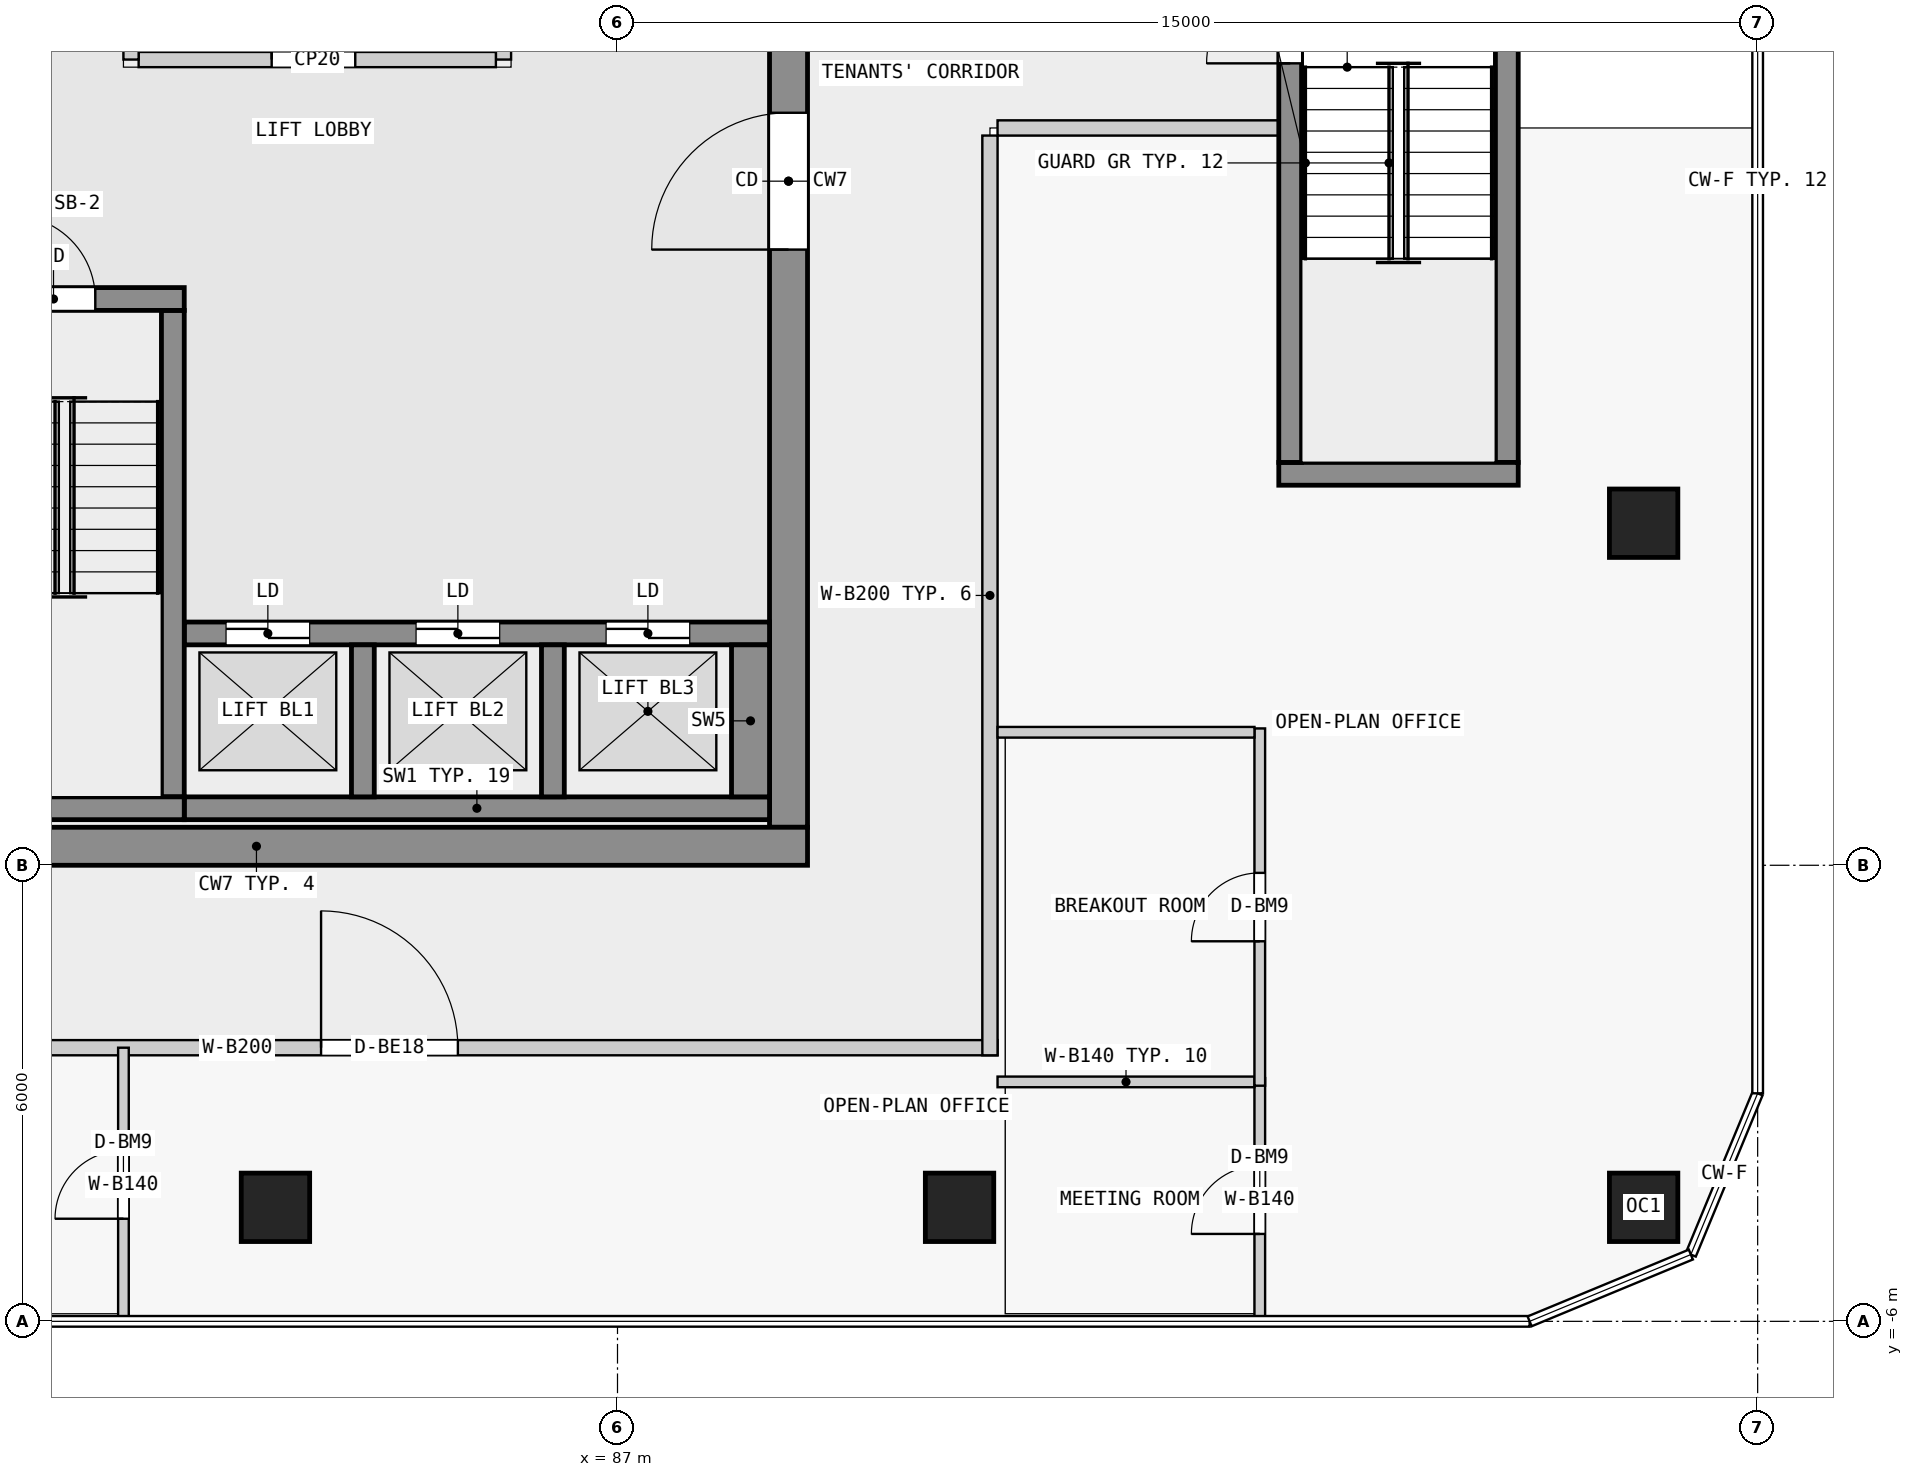
"""IFC4 building model, lengths in metres.
Left out: names, types, materials, properties, quantities, classifications, styles, units other than length and angle.
Written with IfcOpenShell. Run it as: python <this file> out.ifc"""

import sys

from ifc_helpers import new_model, si_unit, direction, frame, frame_2d, origin, origin_2d, place, context, subcontext, project, spatial, rectangle, extrude, element, fill, save


model = new_model("IFC4")
c1 = context("Model", 3, precision=1e-05, world=origin(), true_north=direction((0.0, 1.0)))
c2 = subcontext(c1, "Body", "Model", "MODEL_VIEW")
j1 = project(units=[si_unit("LENGTHUNIT", "METRE"), si_unit("PLANEANGLEUNIT", "RADIAN")], contexts=[c1])
p1 = place(None, origin())
s1 = spatial("IfcSite", under=j1, at=p1, CompositionType="ELEMENT")
p2 = place(p1, origin())
s2 = spatial("IfcBuilding", under=s1, at=p2, CompositionType="ELEMENT")
p3 = place(p2, frame((0.0, 0.0, 47.8)))
s3 = spatial("IfcBuildingStorey", under=s2, at=p3, CompositionType="ELEMENT", Elevation=47.8)
for number, where, z_axis, x_axis in (
    (1, (82.5, -4.5, 0.0), (0.0, 0.0, 1.0), (1.0, 0.0, 0.0)),
    (2, (91.5, -4.5, 0.0), (0.0, 0.0, 1.0), (1.0, 0.0, 0.0)),
    (3, (100.5, -4.5, 0.0), (0.0, 0.0, 1.0), (1.0, 0.0, 0.0)),
    (4, (100.5, 4.5, 0.0), (0.0, 0.0, 1.0), (1.0, 0.0, 0.0)),
):
    element("IfcColumn", number, at=place(p3, frame(where, z_axis=z_axis, x_axis=x_axis)), inside=s3, PredefinedType="COLUMN", context=c2, shape_type="SweptSolid", body=[
        extrude(rectangle(XDim=0.9, YDim=0.9, at=origin_2d()), origin(), (0.0, 0.0, 1.0), 3.5),
    ])
p4 = place(p3, frame((75.0, 0.25, 0.0), z_axis=(0.0, 0.0, 1.0), x_axis=(1.0, 0.0, 0.0)))
e5 = element("IfcWall", 5, at=p4, inside=s3, PredefinedType="SHEAR", context=c2, shape_type="SweptSolid", body=[
    extrude(rectangle(XDim=14.5, YDim=0.5, at=frame_2d((7.25, 0.0))), origin(), (0.0, 0.0, 1.0), 3.25),
])
p5 = place(p3, frame((89.25, 0.5, 0.0), z_axis=(0.0, 0.0, 1.0), x_axis=(0.0, 1.0, 0.0)))
e6 = element("IfcWall", 6, at=p5, inside=s3, PredefinedType="SHEAR", context=c2, shape_type="SweptSolid", body=[
    extrude(rectangle(XDim=17.0, YDim=0.5, at=frame_2d((8.5, 0.0))), origin(), (0.0, 0.0, 1.0), 3.25),
])
p6 = place(p5, frame((7.6, 0.0, 0.0)))
e7 = element("IfcOpeningElement", 7, at=p6, cuts=e6, PredefinedType="OPENING", context=c2, shape_type="SweptSolid", body=[
    extrude(rectangle(XDim=1.8, YDim=2.1, at=frame_2d((0.9, 1.05))), frame((0.0, 0.26, 0.0), z_axis=(0.0, -1.0, 0.0), x_axis=(1.0, 0.0, 0.0)), (0.0, 0.0, 1.0), 0.52),
])
p7 = place(p3, frame((75.48, 0.75, 0.0), z_axis=(0.0, 0.0, 1.0), x_axis=(1.0, 0.0, 0.0)))
e8 = element("IfcWall", 8, at=p7, inside=s3, PredefinedType="SHEAR", context=c2, shape_type="SweptSolid", body=[
    extrude(rectangle(XDim=5.82, YDim=0.3, at=frame_2d((2.91, 0.0))), origin(), (0.0, 0.0, 1.0), 3.25),
])
p8 = place(p3, frame((75.48, 7.45, 0.0), z_axis=(0.0, 0.0, 1.0), x_axis=(1.0, 0.0, 0.0)))
e9 = element("IfcWall", 9, at=p8, inside=s3, PredefinedType="SHEAR", context=c2, shape_type="SweptSolid", body=[
    extrude(rectangle(XDim=5.82, YDim=0.3, at=frame_2d((2.91, 0.0))), origin(), (0.0, 0.0, 1.0), 3.25),
])
p9 = place(p8, frame((0.75, 0.0, 0.0)))
e10 = element("IfcOpeningElement", 10, at=p9, cuts=e9, PredefinedType="OPENING", context=c2, shape_type="SweptSolid", body=[
    extrude(rectangle(XDim=1.1, YDim=2.1, at=frame_2d((0.55, 1.05))), frame((0.0, 0.16, 0.0), z_axis=(0.0, -1.0, 0.0), x_axis=(1.0, 0.0, 0.0)), (0.0, 0.0, 1.0), 0.32),
])
p10 = place(p8, frame((3.55, 0.0, 0.0)))
e11 = element("IfcOpeningElement", 11, at=p10, cuts=e9, PredefinedType="OPENING", context=c2, shape_type="SweptSolid", body=[
    extrude(rectangle(XDim=1.1, YDim=2.1, at=frame_2d((0.55, 1.05))), frame((0.0, 0.16, 0.0), z_axis=(0.0, -1.0, 0.0), x_axis=(1.0, 0.0, 0.0)), (0.0, 0.0, 1.0), 0.32),
])
p11 = place(p3, frame((81.15, 0.9, 0.0), z_axis=(0.0, 0.0, 1.0), x_axis=(0.0, 1.0, 0.0)))
e12 = element("IfcWall", 12, at=p11, inside=s3, PredefinedType="SHEAR", context=c2, shape_type="SweptSolid", body=[
    extrude(rectangle(XDim=6.4, YDim=0.3, at=frame_2d((3.2, 0.0))), origin(), (0.0, 0.0, 1.0), 3.25),
])
p12 = place(p3, frame((81.3, 0.75, 0.0), z_axis=(0.0, 0.0, 1.0), x_axis=(1.0, 0.0, 0.0)))
e13 = element("IfcWall", 13, at=p12, inside=s3, PredefinedType="SHEAR", context=c2, shape_type="SweptSolid", body=[
    extrude(rectangle(XDim=7.7, YDim=0.3, at=frame_2d((3.85, 0.0))), origin(), (0.0, 0.0, 1.0), 3.25),
])
for number, where, z_axis, x_axis in (
    (14, (83.65, 0.9, 0.0), (0.0, 0.0, 1.0), (0.0, 1.0, 0.0)),
    (15, (86.15, 0.9, 0.0), (0.0, 0.0, 1.0), (0.0, 1.0, 0.0)),
):
    element("IfcWall", number, at=place(p3, frame(where, z_axis=z_axis, x_axis=x_axis)), inside=s3, PredefinedType="SHEAR", context=c2, shape_type="SweptSolid", body=[
        extrude(rectangle(XDim=2.0, YDim=0.3, at=frame_2d((1.0, 0.0))), origin(), (0.0, 0.0, 1.0), 3.25),
    ])
p13 = place(p3, frame((88.75, 0.9, 0.0), z_axis=(0.0, 0.0, 1.0), x_axis=(0.0, 1.0, 0.0)))
e16 = element("IfcWall", 16, at=p13, inside=s3, PredefinedType="SHEAR", context=c2, shape_type="SweptSolid", body=[
    extrude(rectangle(XDim=2.0, YDim=0.5, at=frame_2d((1.0, 0.0))), origin(), (0.0, 0.0, 1.0), 3.25),
])
p14 = place(p3, frame((81.3, 3.05, 0.0), z_axis=(0.0, 0.0, 1.0), x_axis=(1.0, 0.0, 0.0)))
e17 = element("IfcWall", 17, at=p14, inside=s3, PredefinedType="SHEAR", context=c2, shape_type="SweptSolid", body=[
    extrude(rectangle(XDim=7.7, YDim=0.3, at=frame_2d((3.85, 0.0))), origin(), (0.0, 0.0, 1.0), 3.25),
])
p15 = place(p14, frame((0.55, 0.0, 0.0)))
e18 = element("IfcOpeningElement", 18, at=p15, cuts=e17, PredefinedType="OPENING", context=c2, shape_type="SweptSolid", body=[
    extrude(rectangle(XDim=1.1, YDim=2.1, at=frame_2d((0.55, 1.05))), frame((0.0, 0.16, 0.0), z_axis=(0.0, -1.0, 0.0), x_axis=(1.0, 0.0, 0.0)), (0.0, 0.0, 1.0), 0.32),
])
p16 = place(p14, frame((3.05, 0.0, 0.0)))
e19 = element("IfcOpeningElement", 19, at=p16, cuts=e17, PredefinedType="OPENING", context=c2, shape_type="SweptSolid", body=[
    extrude(rectangle(XDim=1.1, YDim=2.1, at=frame_2d((0.55, 1.05))), frame((0.0, 0.16, 0.0), z_axis=(0.0, -1.0, 0.0), x_axis=(1.0, 0.0, 0.0)), (0.0, 0.0, 1.0), 0.32),
])
p17 = place(p14, frame((5.55, 0.0, 0.0)))
e20 = element("IfcOpeningElement", 20, at=p17, cuts=e17, PredefinedType="OPENING", context=c2, shape_type="SweptSolid", body=[
    extrude(rectangle(XDim=1.1, YDim=2.1, at=frame_2d((0.55, 1.05))), frame((0.0, 0.16, 0.0), z_axis=(0.0, -1.0, 0.0), x_axis=(1.0, 0.0, 0.0)), (0.0, 0.0, 1.0), 0.32),
])
p18 = place(p3, frame((95.85, 5.3, 0.0), z_axis=(0.0, 0.0, 1.0), x_axis=(0.0, 1.0, 0.0)))
e21 = element("IfcWall", 21, at=p18, inside=s3, PredefinedType="SHEAR", context=c2, shape_type="SweptSolid", body=[
    extrude(rectangle(XDim=6.4, YDim=0.3, at=frame_2d((3.2, 0.0))), origin(), (0.0, 0.0, 1.0), 3.25),
])
p19 = place(p18, frame((5.25, 0.0, 0.0)))
e22 = element("IfcOpeningElement", 22, at=p19, cuts=e21, PredefinedType="OPENING", context=c2, shape_type="SweptSolid", body=[
    extrude(rectangle(XDim=1.1, YDim=2.1, at=frame_2d((0.55, 1.05))), frame((0.0, 0.16, 0.0), z_axis=(0.0, -1.0, 0.0), x_axis=(1.0, 0.0, 0.0)), (0.0, 0.0, 1.0), 0.32),
])
p20 = place(p3, frame((98.7, 5.3, 0.0), z_axis=(0.0, 0.0, 1.0), x_axis=(0.0, 1.0, 0.0)))
e23 = element("IfcWall", 23, at=p20, inside=s3, PredefinedType="SHEAR", context=c2, shape_type="SweptSolid", body=[
    extrude(rectangle(XDim=6.4, YDim=0.3, at=frame_2d((3.2, 0.0))), origin(), (0.0, 0.0, 1.0), 3.25),
])
p21 = place(p3, frame((95.7, 5.15, 0.0), z_axis=(0.0, 0.0, 1.0), x_axis=(1.0, 0.0, 0.0)))
e24 = element("IfcWall", 24, at=p21, inside=s3, PredefinedType="SHEAR", context=c2, shape_type="SweptSolid", body=[
    extrude(rectangle(XDim=3.15, YDim=0.3, at=frame_2d((1.575, 0.0))), origin(), (0.0, 0.0, 1.0), 3.25),
])
p22 = place(p3, frame((80.6, 10.6, 0.0), z_axis=(0.0, 0.0, 1.0), x_axis=(0.0, 1.0, 0.0)))
e25 = element("IfcWall", 25, at=p22, inside=s3, PredefinedType="PARTITIONING", context=c2, shape_type="SweptSolid", body=[
    extrude(rectangle(XDim=3.4, YDim=0.2, at=frame_2d((1.7, 0.0))), origin(), (0.0, 0.0, 1.0), 3.25),
])
p23 = place(p3, frame((80.7, 10.6, 0.0), z_axis=(0.0, 0.0, 1.0), x_axis=(1.0, 0.0, 0.0)))
e26 = element("IfcWall", 26, at=p23, inside=s3, PredefinedType="PARTITIONING", context=c2, shape_type="SweptSolid", body=[
    extrude(rectangle(XDim=4.7, YDim=0.2, at=frame_2d((2.35, 0.0))), origin(), (0.0, 0.0, 1.0), 3.25),
])
p24 = place(p23, frame((1.75, 0.0, 0.0)))
e27 = element("IfcOpeningElement", 27, at=p24, cuts=e26, PredefinedType="OPENING", context=c2, shape_type="SweptSolid", body=[
    extrude(rectangle(XDim=1.1, YDim=2.1, at=frame_2d((0.55, 1.05))), frame((0.0, 0.11, 0.0), z_axis=(0.0, -1.0, 0.0), x_axis=(1.0, 0.0, 0.0)), (0.0, 0.0, 1.0), 0.22),
])
p25 = place(p3, frame((85.5, 10.6, 0.0), z_axis=(0.0, 0.0, 1.0), x_axis=(0.0, 1.0, 0.0)))
e28 = element("IfcWall", 28, at=p25, inside=s3, PredefinedType="PARTITIONING", context=c2, shape_type="SweptSolid", body=[
    extrude(rectangle(XDim=3.4, YDim=0.2, at=frame_2d((1.7, 0.0))), origin(), (0.0, 0.0, 1.0), 3.25),
])
p26 = place(p3, frame((72.0, -2.4, 0.0), z_axis=(0.0, 0.0, 1.0), x_axis=(1.0, 0.0, 0.0)))
e29 = element("IfcWall", 29, at=p26, inside=s3, PredefinedType="PARTITIONING", context=c2, shape_type="SweptSolid", body=[
    extrude(rectangle(XDim=20.0, YDim=0.2, at=frame_2d((10.0, 0.0))), origin(), (0.0, 0.0, 1.0), 3.25),
])
p27 = place(p26, frame((11.1, 0.0, 0.0)))
e30 = element("IfcOpeningElement", 30, at=p27, cuts=e29, PredefinedType="OPENING", context=c2, shape_type="SweptSolid", body=[
    extrude(rectangle(XDim=1.8, YDim=2.1, at=frame_2d((0.9, 1.05))), frame((0.0, 0.11, 0.0), z_axis=(0.0, -1.0, 0.0), x_axis=(1.0, 0.0, 0.0)), (0.0, 0.0, 1.0), 0.22),
])
p28 = place(p3, frame((91.9, -2.5, 0.0), z_axis=(0.0, 0.0, 1.0), x_axis=(0.0, 1.0, 0.0)))
e31 = element("IfcWall", 31, at=p28, inside=s3, PredefinedType="PARTITIONING", context=c2, shape_type="SweptSolid", body=[
    extrude(rectangle(XDim=12.1, YDim=0.2, at=frame_2d((6.05, 0.0))), origin(), (0.0, 0.0, 1.0), 3.25),
])
p29 = place(p3, frame((92.0, 9.7, 0.0), z_axis=(0.0, 0.0, 1.0), x_axis=(1.0, 0.0, 0.0)))
e32 = element("IfcWall", 32, at=p29, inside=s3, PredefinedType="PARTITIONING", context=c2, shape_type="SweptSolid", body=[
    extrude(rectangle(XDim=3.7, YDim=0.2, at=frame_2d((1.85, 0.0))), origin(), (0.0, 0.0, 1.0), 3.25),
])
p30 = place(p3, frame((80.5, -6.0, 0.0), z_axis=(0.0, 0.0, 1.0), x_axis=(0.0, 1.0, 0.0)))
e33 = element("IfcWall", 33, at=p30, inside=s3, PredefinedType="PARTITIONING", context=c2, shape_type="SweptSolid", body=[
    extrude(rectangle(XDim=3.6, YDim=0.14, at=frame_2d((1.8, 0.0))), origin(), (0.0, 0.0, 1.0), 3.25),
])
p31 = place(p30, frame((1.35, 0.0, 0.0)))
e34 = element("IfcOpeningElement", 34, at=p31, cuts=e33, PredefinedType="OPENING", context=c2, shape_type="SweptSolid", body=[
    extrude(rectangle(XDim=0.9, YDim=2.4, at=frame_2d((0.45, 1.2))), frame((0.0, 0.08, 0.0), z_axis=(0.0, -1.0, 0.0), x_axis=(1.0, 0.0, 0.0)), (0.0, 0.0, 1.0), 0.16),
])
p32 = place(p3, frame((95.45, -6.0, 0.0), z_axis=(0.0, 0.0, 1.0), x_axis=(0.0, 1.0, 0.0)))
e35 = element("IfcWall", 35, at=p32, inside=s3, PredefinedType="PARTITIONING", context=c2, shape_type="SweptSolid", body=[
    extrude(rectangle(XDim=3.2, YDim=0.14, at=frame_2d((1.6, 0.0))), origin(), (0.0, 0.0, 1.0), 3.25),
])
p33 = place(p32, frame((1.15, 0.0, 0.0)))
e36 = element("IfcOpeningElement", 36, at=p33, cuts=e35, PredefinedType="OPENING", context=c2, shape_type="SweptSolid", body=[
    extrude(rectangle(XDim=0.9, YDim=2.4, at=frame_2d((0.45, 1.2))), frame((0.0, 0.08, 0.0), z_axis=(0.0, -1.0, 0.0), x_axis=(1.0, 0.0, 0.0)), (0.0, 0.0, 1.0), 0.16),
])
p34 = place(p3, frame((92.0, -2.85, 0.0), z_axis=(0.0, 0.0, 1.0), x_axis=(1.0, 0.0, 0.0)))
e37 = element("IfcWall", 37, at=p34, inside=s3, PredefinedType="PARTITIONING", context=c2, shape_type="SweptSolid", body=[
    extrude(rectangle(XDim=3.38, YDim=0.14, at=frame_2d((1.69, 0.0))), origin(), (0.0, 0.0, 1.0), 3.25),
])
p35 = place(p3, frame((95.45, -2.9, 0.0), z_axis=(0.0, 0.0, 1.0), x_axis=(0.0, 1.0, 0.0)))
e38 = element("IfcWall", 38, at=p35, inside=s3, PredefinedType="PARTITIONING", context=c2, shape_type="SweptSolid", body=[
    extrude(rectangle(XDim=4.7, YDim=0.14, at=frame_2d((2.35, 0.0))), origin(), (0.0, 0.0, 1.0), 3.25),
])
p36 = place(p35, frame((1.9, 0.0, 0.0)))
e39 = element("IfcOpeningElement", 39, at=p36, cuts=e38, PredefinedType="OPENING", context=c2, shape_type="SweptSolid", body=[
    extrude(rectangle(XDim=0.9, YDim=2.4, at=frame_2d((0.45, 1.2))), frame((0.0, 0.08, 0.0), z_axis=(0.0, -1.0, 0.0), x_axis=(1.0, 0.0, 0.0)), (0.0, 0.0, 1.0), 0.16),
])
p37 = place(p3, frame((92.0, 1.75, 0.0), z_axis=(0.0, 0.0, 1.0), x_axis=(1.0, 0.0, 0.0)))
e40 = element("IfcWall", 40, at=p37, inside=s3, PredefinedType="PARTITIONING", context=c2, shape_type="SweptSolid", body=[
    extrude(rectangle(XDim=3.38, YDim=0.14, at=frame_2d((1.69, 0.0))), origin(), (0.0, 0.0, 1.0), 3.25),
])
p38 = place(p24, origin())
e41 = element("IfcDoor", 41, at=p38, inside=s3, OperationType="SINGLE_SWING_LEFT", PredefinedType="DOOR", context=c2, shape_type="SweptSolid", body=[
    extrude(rectangle(XDim=1.1, YDim=2.1, at=frame_2d((0.55, 1.05))), frame((0.0, 0.025, 0.0), z_axis=(0.0, -1.0, 0.0), x_axis=(1.0, 0.0, 0.0)), (0.0, 0.0, 1.0), 0.05),
])
fill(e27, e41)
p39 = place(p15, origin())
e42 = element("IfcDoor", 42, at=p39, inside=s3, OperationType="DOUBLE_DOOR_SLIDING", PredefinedType="DOOR", context=c2, shape_type="SweptSolid", body=[
    extrude(rectangle(XDim=1.1, YDim=2.1, at=frame_2d((0.55, 1.05))), frame((0.0, 0.025, 0.0), z_axis=(0.0, -1.0, 0.0), x_axis=(1.0, 0.0, 0.0)), (0.0, 0.0, 1.0), 0.05),
])
fill(e18, e42)
p40 = place(p16, origin())
e43 = element("IfcDoor", 43, at=p40, inside=s3, OperationType="DOUBLE_DOOR_SLIDING", PredefinedType="DOOR", context=c2, shape_type="SweptSolid", body=[
    extrude(rectangle(XDim=1.1, YDim=2.1, at=frame_2d((0.55, 1.05))), frame((0.0, 0.025, 0.0), z_axis=(0.0, -1.0, 0.0), x_axis=(1.0, 0.0, 0.0)), (0.0, 0.0, 1.0), 0.05),
])
fill(e19, e43)
p41 = place(p17, origin())
e44 = element("IfcDoor", 44, at=p41, inside=s3, OperationType="DOUBLE_DOOR_SLIDING", PredefinedType="DOOR", context=c2, shape_type="SweptSolid", body=[
    extrude(rectangle(XDim=1.1, YDim=2.1, at=frame_2d((0.55, 1.05))), frame((0.0, 0.025, 0.0), z_axis=(0.0, -1.0, 0.0), x_axis=(1.0, 0.0, 0.0)), (0.0, 0.0, 1.0), 0.05),
])
fill(e20, e44)
p42 = place(p10, origin())
e45 = element("IfcDoor", 45, at=p42, inside=s3, OperationType="SINGLE_SWING_LEFT", PredefinedType="DOOR", context=c2, shape_type="SweptSolid", body=[
    extrude(rectangle(XDim=1.1, YDim=2.1, at=frame_2d((0.55, 1.05))), frame((0.0, 0.025, 0.0), z_axis=(0.0, -1.0, 0.0), x_axis=(1.0, 0.0, 0.0)), (0.0, 0.0, 1.0), 0.05),
])
fill(e11, e45)
p43 = place(p19, origin())
e46 = element("IfcDoor", 46, at=p43, inside=s3, OperationType="SINGLE_SWING_LEFT", PredefinedType="DOOR", context=c2, shape_type="SweptSolid", body=[
    extrude(rectangle(XDim=1.1, YDim=2.1, at=frame_2d((0.55, 1.05))), frame((0.0, 0.025, 0.0), z_axis=(0.0, -1.0, 0.0), x_axis=(1.0, 0.0, 0.0)), (0.0, 0.0, 1.0), 0.05),
])
fill(e22, e46)
p44 = place(p6, origin())
e47 = element("IfcDoor", 47, at=p44, inside=s3, OperationType="DOUBLE_DOOR_SINGLE_SWING", PredefinedType="DOOR", context=c2, shape_type="SweptSolid", body=[
    extrude(rectangle(XDim=1.8, YDim=2.1, at=frame_2d((0.9, 1.05))), frame((0.0, 0.025, 0.0), z_axis=(0.0, -1.0, 0.0), x_axis=(1.0, 0.0, 0.0)), (0.0, 0.0, 1.0), 0.05),
])
fill(e7, e47)
p45 = place(p27, origin())
e48 = element("IfcDoor", 48, at=p45, inside=s3, OperationType="DOUBLE_DOOR_SINGLE_SWING", PredefinedType="DOOR", context=c2, shape_type="SweptSolid", body=[
    extrude(rectangle(XDim=1.8, YDim=2.1, at=frame_2d((0.9, 1.05))), frame((0.0, 0.025, 0.0), z_axis=(0.0, -1.0, 0.0), x_axis=(1.0, 0.0, 0.0)), (0.0, 0.0, 1.0), 0.05),
])
fill(e30, e48)
p46 = place(p31, origin())
e49 = element("IfcDoor", 49, at=p46, inside=s3, OperationType="SINGLE_SWING_LEFT", PredefinedType="DOOR", context=c2, shape_type="SweptSolid", body=[
    extrude(rectangle(XDim=0.9, YDim=2.4, at=frame_2d((0.45, 1.2))), frame((0.0, 0.025, 0.0), z_axis=(0.0, -1.0, 0.0), x_axis=(1.0, 0.0, 0.0)), (0.0, 0.0, 1.0), 0.05),
])
fill(e34, e49)
p47 = place(p33, origin())
e50 = element("IfcDoor", 50, at=p47, inside=s3, OperationType="SINGLE_SWING_LEFT", PredefinedType="DOOR", context=c2, shape_type="SweptSolid", body=[
    extrude(rectangle(XDim=0.9, YDim=2.4, at=frame_2d((0.45, 1.2))), frame((0.0, 0.025, 0.0), z_axis=(0.0, -1.0, 0.0), x_axis=(1.0, 0.0, 0.0)), (0.0, 0.0, 1.0), 0.05),
])
fill(e36, e50)
p48 = place(p36, origin())
e51 = element("IfcDoor", 51, at=p48, inside=s3, OperationType="SINGLE_SWING_LEFT", PredefinedType="DOOR", context=c2, shape_type="SweptSolid", body=[
    extrude(rectangle(XDim=0.9, YDim=2.4, at=frame_2d((0.45, 1.2))), frame((0.0, 0.025, 0.0), z_axis=(0.0, -1.0, 0.0), x_axis=(1.0, 0.0, 0.0)), (0.0, 0.0, 1.0), 0.05),
])
fill(e39, e51)
save(model, sys.argv[1])
